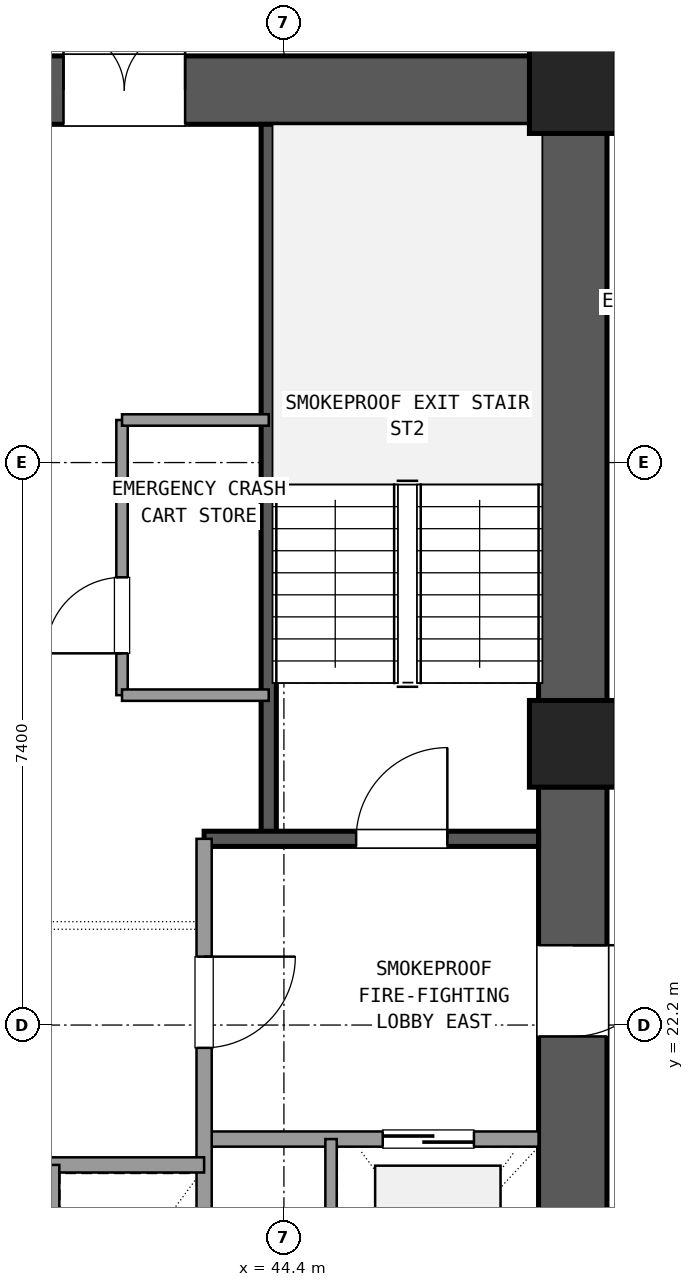
"""IFC4 building model, lengths in metres.
Left out: names, types, materials, properties, quantities, classifications, styles, units other than length and angle.
Written with IfcOpenShell. Run it as: python <this file> out.ifc"""

import sys

from ifc_helpers import new_model, si_unit, direction, frame, frame_2d, origin, origin_2d, place, context, subcontext, project, spatial, rectangle, extrude, element, fill, save


model = new_model("IFC4")
c1 = context("Model", 3, precision=1e-05, world=origin(), true_north=direction((0.0, 1.0)))
c2 = subcontext(c1, "Body", "Model", "MODEL_VIEW")
j1 = project(units=[si_unit("LENGTHUNIT", "METRE"), si_unit("PLANEANGLEUNIT", "RADIAN")], contexts=[c1])
p1 = place(None, origin())
s1 = spatial("IfcSite", under=j1, at=p1, CompositionType="ELEMENT")
p2 = place(p1, origin())
s2 = spatial("IfcBuilding", under=s1, at=p2, CompositionType="ELEMENT")
p3 = place(p2, frame((0.0, 0.0, 59.94)))
s3 = spatial("IfcBuildingStorey", under=s2, at=p3, CompositionType="ELEMENT", Elevation=59.94)
for number, where, z_axis, x_axis in (
    (1, (48.2, 25.9, 0.0), (0.0, 0.0, 1.0), (1.0, 0.0, 0.0)),
    (2, (48.2, 34.5, 0.0), (0.0, 0.0, 1.0), (1.0, 0.0, 0.0)),
):
    element("IfcColumn", number, at=place(p3, frame(where, z_axis=z_axis, x_axis=x_axis)), inside=s3, PredefinedType="COLUMN", context=c2, shape_type="SweptSolid", body=[
        extrude(rectangle(XDim=1.14, YDim=1.14, at=origin_2d()), origin(), (0.0, 0.0, 1.0), 3.6),
    ])
p4 = place(p3, frame((48.2, 17.865, 0.0), z_axis=(0.0, 0.0, 1.0), x_axis=(0.0, 1.0, 0.0)))
e3 = element("IfcWall", 3, at=p4, inside=s3, PredefinedType="SHEAR", context=c2, shape_type="SweptSolid", body=[
    extrude(rectangle(XDim=7.47, YDim=0.9, at=frame_2d((3.735, 0.0))), origin(), (0.0, 0.0, 1.0), 3.32),
])
p5 = place(p4, frame((4.185, 0.0, 0.0)))
e4 = element("IfcOpeningElement", 4, at=p5, cuts=e3, PredefinedType="OPENING", context=c2, shape_type="SweptSolid", body=[
    extrude(rectangle(XDim=1.2, YDim=2.15, at=frame_2d((0.6, 1.075))), frame((0.0, 0.46, 0.0), z_axis=(0.0, -1.0, 0.0), x_axis=(1.0, 0.0, 0.0)), (0.0, 0.0, 1.0), 0.92),
])
p6 = place(p3, frame((48.2, 26.465, 0.0), z_axis=(0.0, 0.0, 1.0), x_axis=(0.0, 1.0, 0.0)))
e5 = element("IfcWall", 5, at=p6, inside=s3, PredefinedType="SHEAR", context=c2, shape_type="SweptSolid", body=[
    extrude(rectangle(XDim=7.47, YDim=0.9, at=frame_2d((3.735, 0.0))), origin(), (0.0, 0.0, 1.0), 3.32),
])
p7 = place(p3, frame((47.635, 34.5, 0.0), z_axis=(0.0, 0.0, 1.0), x_axis=(-1.0, 0.0, 0.0)))
e6 = element("IfcWall", 6, at=p7, inside=s3, PredefinedType="SHEAR", context=c2, shape_type="SweptSolid", body=[
    extrude(rectangle(XDim=10.07, YDim=0.9, at=frame_2d((5.035, 0.0))), origin(), (0.0, 0.0, 1.0), 3.32),
])
p8 = place(p7, frame((4.535, 0.0, 0.0)))
e7 = element("IfcOpeningElement", 7, at=p8, cuts=e6, PredefinedType="OPENING", context=c2, shape_type="SweptSolid", body=[
    extrude(rectangle(XDim=1.6, YDim=2.2, at=frame_2d((0.8, 1.1))), frame((0.0, 0.46, 0.0), z_axis=(0.0, -1.0, 0.0), x_axis=(1.0, 0.0, 0.0)), (0.0, 0.0, 1.0), 0.92),
])
p9 = place(p3, frame((44.2, 24.65, 0.0), z_axis=(0.0, 0.0, 1.0), x_axis=(0.0, 1.0, 0.0)))
e8 = element("IfcWall", 8, at=p9, inside=s3, PredefinedType="SHEAR", context=c2, shape_type="SweptSolid", body=[
    extrude(rectangle(XDim=9.4, YDim=0.2, at=frame_2d((4.7, 0.0))), origin(), (0.0, 0.0, 1.0), 3.32),
])
p10 = place(p3, frame((43.35, 24.65, 0.0), z_axis=(0.0, 0.0, 1.0), x_axis=(1.0, 0.0, 0.0)))
e9 = element("IfcWall", 9, at=p10, inside=s3, PredefinedType="SHEAR", context=c2, shape_type="SweptSolid", body=[
    extrude(rectangle(XDim=4.4, YDim=0.2, at=frame_2d((2.2, 0.0))), origin(), (0.0, 0.0, 1.0), 3.32),
])
p11 = place(p10, frame((2.0, 0.0, 0.0)))
e10 = element("IfcOpeningElement", 10, at=p11, cuts=e9, PredefinedType="OPENING", context=c2, shape_type="SweptSolid", body=[
    extrude(rectangle(XDim=1.2, YDim=2.15, at=frame_2d((0.6, 1.075))), frame((0.0, 0.11, 0.0), z_axis=(0.0, -1.0, 0.0), x_axis=(1.0, 0.0, 0.0)), (0.0, 0.0, 1.0), 0.22),
])
p12 = place(p3, frame((43.35, 20.7, 0.0), z_axis=(0.0, 0.0, 1.0), x_axis=(1.0, 0.0, 0.0)))
e11 = element("IfcWall", 11, at=p12, inside=s3, PredefinedType="SOLIDWALL", context=c2, shape_type="SweptSolid", body=[
    extrude(rectangle(XDim=4.4, YDim=0.2, at=frame_2d((2.2, 0.0))), origin(), (0.0, 0.0, 1.0), 2.61),
])
p13 = place(p12, frame((2.35, 0.0, 0.0)))
e12 = element("IfcOpeningElement", 12, at=p13, cuts=e11, PredefinedType="OPENING", context=c2, shape_type="SweptSolid", body=[
    extrude(rectangle(XDim=1.2, YDim=2.15, at=frame_2d((0.6, 1.075))), frame((0.0, 0.11, 0.0), z_axis=(0.0, -1.0, 0.0), x_axis=(1.0, 0.0, 0.0)), (0.0, 0.0, 1.0), 0.22),
])
p14 = place(p3, frame((43.35, 17.75, 0.0), z_axis=(0.0, 0.0, 1.0), x_axis=(0.0, 1.0, 0.0)))
e13 = element("IfcWall", 13, at=p14, inside=s3, PredefinedType="SOLIDWALL", context=c2, shape_type="SweptSolid", body=[
    extrude(rectangle(XDim=6.9, YDim=0.2, at=frame_2d((3.45, 0.0))), origin(), (0.0, 0.0, 1.0), 2.61),
])
p15 = place(p14, frame((4.15, 0.0, 0.0)))
e14 = element("IfcOpeningElement", 14, at=p15, cuts=e13, PredefinedType="OPENING", context=c2, shape_type="SweptSolid", body=[
    extrude(rectangle(XDim=1.2, YDim=2.15, at=frame_2d((0.6, 1.075))), frame((0.0, 0.11, 0.0), z_axis=(0.0, -1.0, 0.0), x_axis=(1.0, 0.0, 0.0)), (0.0, 0.0, 1.0), 0.22),
])
p16 = place(p3, frame((45.02, 17.75, 0.0), z_axis=(0.0, 0.0, 1.0), x_axis=(0.0, 1.0, 0.0)))
e15 = element("IfcWall", 15, at=p16, inside=s3, PredefinedType="PARTITIONING", context=c2, shape_type="SweptSolid", body=[
    extrude(rectangle(XDim=2.95, YDim=0.15, at=frame_2d((1.475, 0.0))), origin(), (0.0, 0.0, 1.0), 2.61),
])
p17 = place(p3, frame((37.25, 20.36, 0.0), z_axis=(0.0, 0.0, 1.0), x_axis=(1.0, 0.0, 0.0)))
e16 = element("IfcWall", 16, at=p17, inside=s3, PredefinedType="SOLIDWALL", context=c2, shape_type="SweptSolid", body=[
    extrude(rectangle(XDim=6.1, YDim=0.2, at=frame_2d((3.05, 0.0))), origin(), (0.0, 0.0, 1.0), 2.61),
])
p18 = place(p3, frame((41.37, 17.75, 0.0), z_axis=(0.0, 0.0, 1.0), x_axis=(0.0, 1.0, 0.0)))
e17 = element("IfcWall", 17, at=p18, inside=s3, PredefinedType="PARTITIONING", context=c2, shape_type="SweptSolid", body=[
    extrude(rectangle(XDim=2.61, YDim=0.15, at=frame_2d((1.305, 0.0))), origin(), (0.0, 0.0, 1.0), 2.61),
])
p19 = place(p3, frame((42.27, 26.54, 0.0), z_axis=(0.0, 0.0, 1.0), x_axis=(0.0, 1.0, 0.0)))
e18 = element("IfcWall", 18, at=p19, inside=s3, PredefinedType="PARTITIONING", context=c2, shape_type="SweptSolid", body=[
    extrude(rectangle(XDim=3.62, YDim=0.15, at=frame_2d((1.81, 0.0))), origin(), (0.0, 0.0, 1.0), 2.61),
])
p20 = place(p19, frame((0.55, 0.0, 0.0)))
e19 = element("IfcOpeningElement", 19, at=p20, cuts=e18, PredefinedType="OPENING", context=c2, shape_type="SweptSolid", body=[
    extrude(rectangle(XDim=1.0, YDim=2.15, at=frame_2d((0.5, 1.075))), frame((0.0, 0.085, 0.0), z_axis=(0.0, -1.0, 0.0), x_axis=(1.0, 0.0, 0.0)), (0.0, 0.0, 1.0), 0.17),
])
for number, where, z_axis, x_axis in (
    (20, (42.27, 26.54, 0.0), (0.0, 0.0, 1.0), (1.0, 0.0, 0.0)),
    (21, (42.27, 30.16, 0.0), (0.0, 0.0, 1.0), (1.0, 0.0, 0.0)),
):
    element("IfcWall", number, at=place(p3, frame(where, z_axis=z_axis, x_axis=x_axis)), inside=s3, PredefinedType="PARTITIONING", context=c2, shape_type="SweptSolid", body=[
        extrude(rectangle(XDim=1.93, YDim=0.15, at=frame_2d((0.965, 0.0))), origin(), (0.0, 0.0, 1.0), 2.61),
    ])
p21 = place(p11, origin())
e22 = element("IfcDoor", 22, at=p21, inside=s3, OperationType="SINGLE_SWING_RIGHT", PredefinedType="DOOR", context=c2, shape_type="SweptSolid", body=[
    extrude(rectangle(XDim=1.2, YDim=2.15, at=frame_2d((0.6, 1.075))), frame((0.0, 0.025, 0.0), z_axis=(0.0, -1.0, 0.0), x_axis=(1.0, 0.0, 0.0)), (0.0, 0.0, 1.0), 0.05),
])
fill(e10, e22)
p22 = place(p13, origin())
e23 = element("IfcDoor", 23, at=p22, inside=s3, OperationType="SLIDING_TO_RIGHT", PredefinedType="DOOR", context=c2, shape_type="SweptSolid", body=[
    extrude(rectangle(XDim=1.2, YDim=2.15, at=frame_2d((0.6, 1.075))), frame((0.0, 0.025, 0.0), z_axis=(0.0, -1.0, 0.0), x_axis=(1.0, 0.0, 0.0)), (0.0, 0.0, 1.0), 0.05),
])
fill(e12, e23)
p23 = place(p15, frame((1.2, 0.0, 0.0), z_axis=(0.0, 0.0, 1.0), x_axis=(-1.0, 0.0, 0.0)))
e24 = element("IfcDoor", 24, at=p23, inside=s3, OperationType="SINGLE_SWING_RIGHT", PredefinedType="DOOR", context=c2, shape_type="SweptSolid", body=[
    extrude(rectangle(XDim=1.2, YDim=2.15, at=frame_2d((0.6, 1.075))), frame((0.0, 0.025, 0.0), z_axis=(0.0, -1.0, 0.0), x_axis=(1.0, 0.0, 0.0)), (0.0, 0.0, 1.0), 0.05),
])
fill(e14, e24)
p24 = place(p5, frame((1.2, 0.0, 0.0), z_axis=(0.0, 0.0, 1.0), x_axis=(-1.0, 0.0, 0.0)))
e25 = element("IfcDoor", 25, at=p24, inside=s3, OperationType="SINGLE_SWING_RIGHT", PredefinedType="DOOR", context=c2, shape_type="SweptSolid", body=[
    extrude(rectangle(XDim=1.2, YDim=2.15, at=frame_2d((0.6, 1.075))), frame((0.0, 0.025, 0.0), z_axis=(0.0, -1.0, 0.0), x_axis=(1.0, 0.0, 0.0)), (0.0, 0.0, 1.0), 0.05),
])
fill(e4, e25)
p25 = place(p8, frame((1.6, 0.0, 0.0), z_axis=(0.0, 0.0, 1.0), x_axis=(-1.0, 0.0, 0.0)))
e26 = element("IfcDoor", 26, at=p25, inside=s3, OperationType="DOUBLE_DOOR_SINGLE_SWING", PredefinedType="DOOR", context=c2, shape_type="SweptSolid", body=[
    extrude(rectangle(XDim=1.6, YDim=2.2, at=frame_2d((0.8, 1.1))), frame((0.0, 0.025, 0.0), z_axis=(0.0, -1.0, 0.0), x_axis=(1.0, 0.0, 0.0)), (0.0, 0.0, 1.0), 0.05),
])
fill(e7, e26)
p26 = place(p20, origin())
e27 = element("IfcDoor", 27, at=p26, inside=s3, OperationType="SINGLE_SWING_LEFT", PredefinedType="DOOR", context=c2, shape_type="SweptSolid", body=[
    extrude(rectangle(XDim=1.0, YDim=2.15, at=frame_2d((0.5, 1.075))), frame((0.0, 0.025, 0.0), z_axis=(0.0, -1.0, 0.0), x_axis=(1.0, 0.0, 0.0)), (0.0, 0.0, 1.0), 0.05),
])
fill(e19, e27)
save(model, sys.argv[1])
